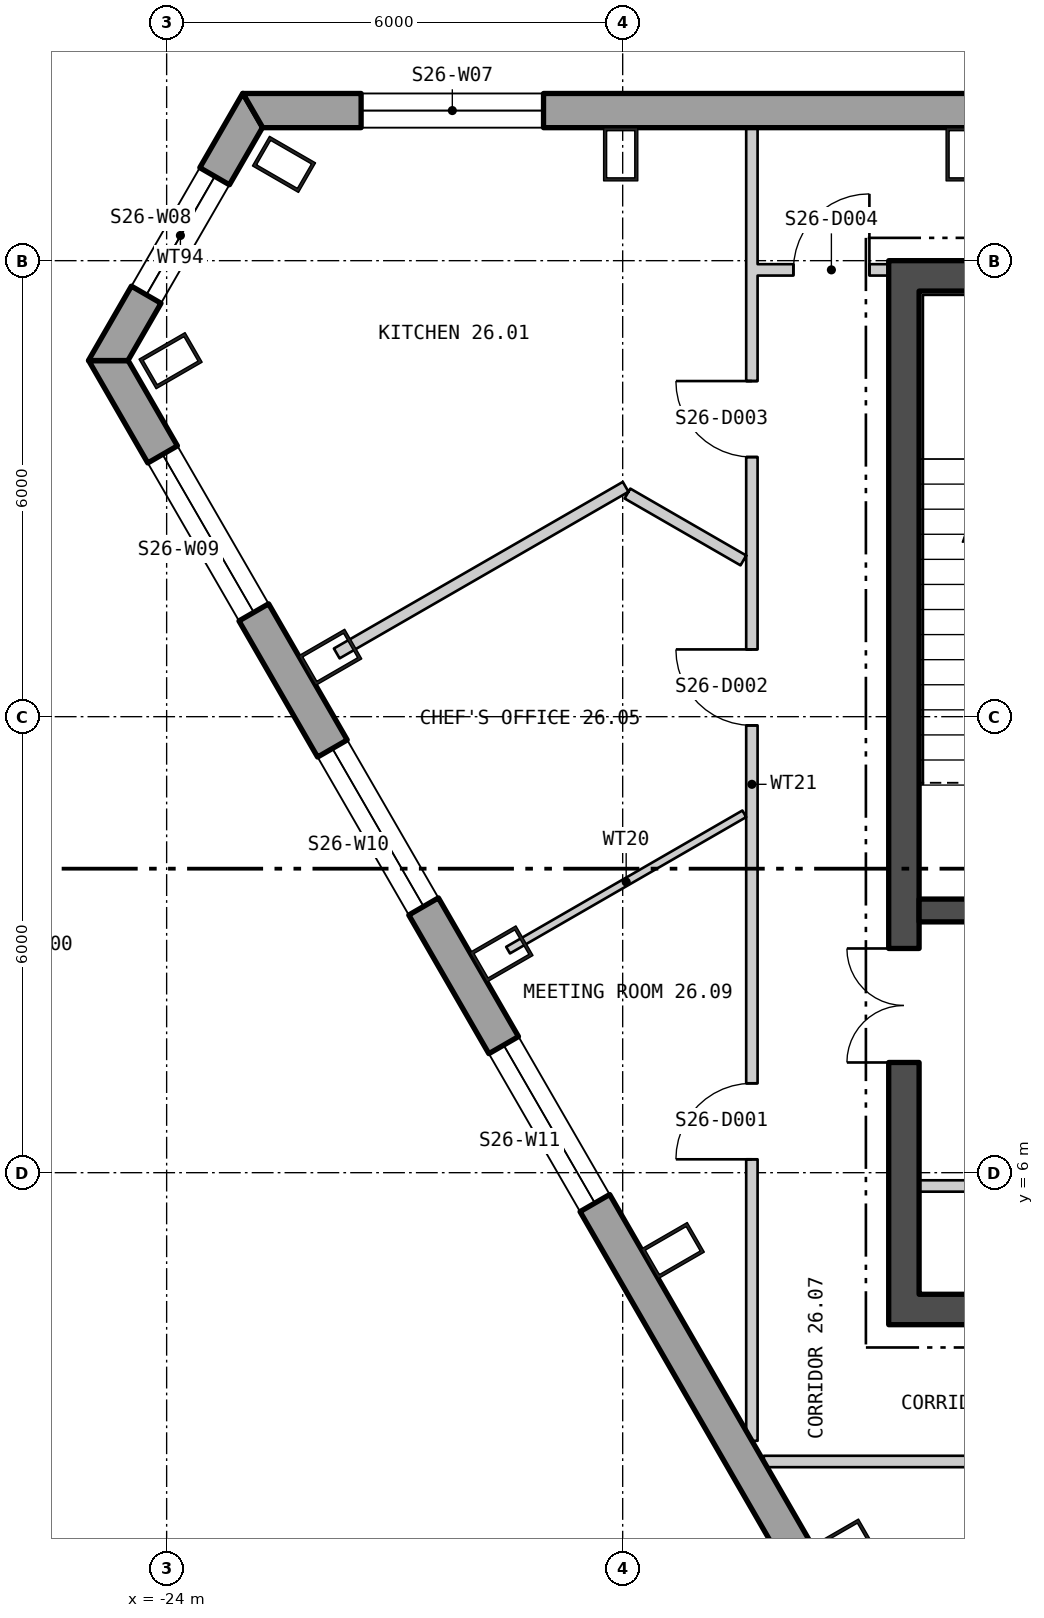
"""IFC4 building model, lengths in metres.
Left out: names, types, materials, properties, quantities, classifications, styles, units other than length and angle.
Written with IfcOpenShell. Run it as: python <this file> out.ifc"""

import sys

from ifc_helpers import new_model, si_unit, direction, frame, frame_2d, origin, origin_2d, place, context, subcontext, project, spatial, polyline, rectangle, hollow_rectangle, outline, extrude, element, fill, save


model = new_model("IFC4")
c1 = context("Model", 3, precision=1e-05, world=origin(), true_north=direction((0.0, 1.0)))
c2 = subcontext(c1, "Body", "Model", "MODEL_VIEW")
j1 = project(units=[si_unit("LENGTHUNIT", "METRE"), si_unit("PLANEANGLEUNIT", "RADIAN")], contexts=[c1])
p1 = place(None, origin())
s1 = spatial("IfcSite", under=j1, at=p1, CompositionType="ELEMENT")
p2 = place(p1, origin())
s2 = spatial("IfcBuilding", under=s1, at=p2, CompositionType="ELEMENT")
p3 = place(p2, frame((0.0, 0.0, 329.4)))
s3 = spatial("IfcBuildingStorey", under=s2, at=p3, CompositionType="ELEMENT", Elevation=329.4)
for number, where, z_axis, x_axis in (
    (1, (-13.52, 19.4, 0.0), (0.0, 0.0, 1.0), (-1.0, 0.0, 0.0)),
    (2, (-18.026, 19.4, 0.0), (0.0, 0.0, 1.0), (-1.0, 0.0, 0.0)),
    (3, (-22.456, 19.267, 0.0), (0.0, 0.0, 1.0), (-0.5, -0.866, 0.0)),
    (4, (-23.948, 16.684, 0.0), (0.0, 0.0, 1.0), (0.5, -0.866, 0.0)),
    (5, (-21.848, 12.781, 0.0), (0.0, 0.0, 1.0), (0.5, -0.866, 0.0)),
    (6, (-19.595, 8.878, 0.0), (0.0, 0.0, 1.0), (0.5, -0.866, 0.0)),
    (7, (-17.341, 4.975, 0.0), (0.0, 0.0, 1.0), (0.5, -0.866, 0.0)),
    (8, (-15.088, 1.073, 0.0), (0.0, 0.0, 1.0), (0.5, -0.866, 0.0)),
):
    element("IfcColumn", number, at=place(p3, frame(where, z_axis=z_axis, x_axis=x_axis)), inside=s3, PredefinedType="COLUMN", context=c2, shape_type="SweptSolid", body=[
        extrude(hollow_rectangle(XDim=0.45, YDim=0.7, WallThickness=0.04, at=origin_2d()), origin(), (0.0, 0.0, 1.0), 4.2),
    ])
p4 = place(p3, frame((22.865, 19.975, -0.4), z_axis=(0.0, 0.0, 1.0), x_axis=(-1.0, 0.0, 0.0)))
e9 = element("IfcWall", 9, at=p4, inside=s3, PredefinedType="SOLIDWALL", context=c2, shape_type="SweptSolid", body=[
    extrude(outline(polyline([(-0.13, -0.225), (45.86, -0.225), (45.6, 0.225), (0.13, 0.225), (-0.13, -0.225)])), origin(), (0.0, 0.0, 1.0), 4.2),
])
p5 = place(p4, frame((1.424, 0.0, 1.3)))
e10 = element("IfcOpeningElement", 10, at=p5, cuts=e9, PredefinedType="OPENING", context=c2, shape_type="SweptSolid", body=[
    extrude(rectangle(XDim=2.4, YDim=2.3, at=frame_2d((1.2, 1.15))), frame((0.0, 0.235, 0.0), z_axis=(0.0, -1.0, 0.0), x_axis=(1.0, 0.0, 0.0)), (0.0, 0.0, 1.0), 0.47),
])
p6 = place(p4, frame((14.905, 0.0, 1.3)))
e11 = element("IfcOpeningElement", 11, at=p6, cuts=e9, PredefinedType="OPENING", context=c2, shape_type="SweptSolid", body=[
    extrude(rectangle(XDim=2.4, YDim=2.3, at=frame_2d((1.2, 1.15))), frame((0.0, 0.235, 0.0), z_axis=(0.0, -1.0, 0.0), x_axis=(1.0, 0.0, 0.0)), (0.0, 0.0, 1.0), 0.47),
])
p7 = place(p4, frame((19.412, 0.0, 1.3)))
e12 = element("IfcOpeningElement", 12, at=p7, cuts=e9, PredefinedType="OPENING", context=c2, shape_type="SweptSolid", body=[
    extrude(rectangle(XDim=2.4, YDim=2.3, at=frame_2d((1.2, 1.15))), frame((0.0, 0.235, 0.0), z_axis=(0.0, -1.0, 0.0), x_axis=(1.0, 0.0, 0.0)), (0.0, 0.0, 1.0), 0.47),
])
p8 = place(p4, frame((23.918, 0.0, 1.3)))
e13 = element("IfcOpeningElement", 13, at=p8, cuts=e9, PredefinedType="OPENING", context=c2, shape_type="SweptSolid", body=[
    extrude(rectangle(XDim=2.4, YDim=2.3, at=frame_2d((1.2, 1.15))), frame((0.0, 0.235, 0.0), z_axis=(0.0, -1.0, 0.0), x_axis=(1.0, 0.0, 0.0)), (0.0, 0.0, 1.0), 0.47),
])
p9 = place(p4, frame((28.425, 0.0, 1.3)))
e14 = element("IfcOpeningElement", 14, at=p9, cuts=e9, PredefinedType="OPENING", context=c2, shape_type="SweptSolid", body=[
    extrude(rectangle(XDim=2.4, YDim=2.3, at=frame_2d((1.2, 1.15))), frame((0.0, 0.235, 0.0), z_axis=(0.0, -1.0, 0.0), x_axis=(1.0, 0.0, 0.0)), (0.0, 0.0, 1.0), 0.47),
])
p10 = place(p4, frame((32.932, 0.0, 1.3)))
e15 = element("IfcOpeningElement", 15, at=p10, cuts=e9, PredefinedType="OPENING", context=c2, shape_type="SweptSolid", body=[
    extrude(rectangle(XDim=2.4, YDim=2.3, at=frame_2d((1.2, 1.15))), frame((0.0, 0.235, 0.0), z_axis=(0.0, -1.0, 0.0), x_axis=(1.0, 0.0, 0.0)), (0.0, 0.0, 1.0), 0.47),
])
p11 = place(p4, frame((41.907, 0.0, 1.3)))
e16 = element("IfcOpeningElement", 16, at=p11, cuts=e9, PredefinedType="OPENING", context=c2, shape_type="SweptSolid", body=[
    extrude(rectangle(XDim=2.4, YDim=2.3, at=frame_2d((1.2, 1.15))), frame((0.0, 0.235, 0.0), z_axis=(0.0, -1.0, 0.0), x_axis=(1.0, 0.0, 0.0)), (0.0, 0.0, 1.0), 0.47),
])
p12 = place(p3, frame((-22.869, 19.977, -0.4), z_axis=(0.0, 0.0, 1.0), x_axis=(-0.499996551991, -0.866027394484, 0.0)))
e17 = element("IfcWall", 17, at=p12, inside=s3, PredefinedType="SOLIDWALL", context=c2, shape_type="SweptSolid", body=[
    extrude(outline(polyline([(-0.13, -0.225), (3.93, -0.225), (3.67, 0.225), (0.13, 0.225), (-0.13, -0.225)])), origin(), (0.0, 0.0, 1.0), 4.2),
])
p13 = place(p12, frame((1.0, 0.0, 1.3)))
e18 = element("IfcOpeningElement", 18, at=p13, cuts=e17, PredefinedType="OPENING", context=c2, shape_type="SweptSolid", body=[
    extrude(rectangle(XDim=1.8, YDim=2.3, at=frame_2d((0.9, 1.15))), frame((0.0, 0.235, 0.0), z_axis=(0.0, -1.0, 0.0), x_axis=(1.0, 0.0, 0.0)), (0.0, 0.0, 1.0), 0.47),
])
p14 = place(p3, frame((-24.765, 16.684, -0.18), z_axis=(0.0, 0.0, 1.0), x_axis=(0.500000141277, -0.866025322218, 0.0)))
e19 = element("IfcWall", 19, at=p14, inside=s3, PredefinedType="SOLIDWALL", context=c2, shape_type="SweptSolid", body=[
    extrude(outline(polyline([(-0.13, -0.225), (45.86, -0.225), (45.6, 0.225), (0.13, 0.225), (-0.13, -0.225)])), origin(), (0.0, 0.0, 1.0), 3.98),
])
p15 = place(p14, frame((1.424, 0.0, 1.08)))
e20 = element("IfcOpeningElement", 20, at=p15, cuts=e19, PredefinedType="OPENING", context=c2, shape_type="SweptSolid", body=[
    extrude(rectangle(XDim=2.4, YDim=2.3, at=frame_2d((1.2, 1.15))), frame((0.0, 0.235, 0.0), z_axis=(0.0, -1.0, 0.0), x_axis=(1.0, 0.0, 0.0)), (0.0, 0.0, 1.0), 0.47),
])
p16 = place(p14, frame((5.892, 0.0, 1.08)))
e21 = element("IfcOpeningElement", 21, at=p16, cuts=e19, PredefinedType="OPENING", context=c2, shape_type="SweptSolid", body=[
    extrude(rectangle(XDim=2.4, YDim=2.3, at=frame_2d((1.2, 1.15))), frame((0.0, 0.235, 0.0), z_axis=(0.0, -1.0, 0.0), x_axis=(1.0, 0.0, 0.0)), (0.0, 0.0, 1.0), 0.47),
])
p17 = place(p14, frame((10.399, 0.0, 1.08)))
e22 = element("IfcOpeningElement", 22, at=p17, cuts=e19, PredefinedType="OPENING", context=c2, shape_type="SweptSolid", body=[
    extrude(rectangle(XDim=2.4, YDim=2.3, at=frame_2d((1.2, 1.15))), frame((0.0, 0.235, 0.0), z_axis=(0.0, -1.0, 0.0), x_axis=(1.0, 0.0, 0.0)), (0.0, 0.0, 1.0), 0.47),
])
p18 = place(p14, frame((19.412, 0.0, 1.08)))
e23 = element("IfcOpeningElement", 23, at=p18, cuts=e19, PredefinedType="OPENING", context=c2, shape_type="SweptSolid", body=[
    extrude(rectangle(XDim=2.4, YDim=2.3, at=frame_2d((1.2, 1.15))), frame((0.0, 0.235, 0.0), z_axis=(0.0, -1.0, 0.0), x_axis=(1.0, 0.0, 0.0)), (0.0, 0.0, 1.0), 0.47),
])
p19 = place(p14, frame((23.918, 0.0, 1.08)))
e24 = element("IfcOpeningElement", 24, at=p19, cuts=e19, PredefinedType="OPENING", context=c2, shape_type="SweptSolid", body=[
    extrude(rectangle(XDim=2.4, YDim=2.3, at=frame_2d((1.2, 1.15))), frame((0.0, 0.235, 0.0), z_axis=(0.0, -1.0, 0.0), x_axis=(1.0, 0.0, 0.0)), (0.0, 0.0, 1.0), 0.47),
])
p20 = place(p14, frame((28.425, 0.0, 1.08)))
e25 = element("IfcOpeningElement", 25, at=p20, cuts=e19, PredefinedType="OPENING", context=c2, shape_type="SweptSolid", body=[
    extrude(rectangle(XDim=2.4, YDim=2.3, at=frame_2d((1.2, 1.15))), frame((0.0, 0.235, 0.0), z_axis=(0.0, -1.0, 0.0), x_axis=(1.0, 0.0, 0.0)), (0.0, 0.0, 1.0), 0.47),
])
p21 = place(p14, frame((37.438, 0.0, 1.08)))
e26 = element("IfcOpeningElement", 26, at=p21, cuts=e19, PredefinedType="OPENING", context=c2, shape_type="SweptSolid", body=[
    extrude(rectangle(XDim=2.4, YDim=2.3, at=frame_2d((1.2, 1.15))), frame((0.0, 0.235, 0.0), z_axis=(0.0, -1.0, 0.0), x_axis=(1.0, 0.0, 0.0)), (0.0, 0.0, 1.0), 0.47),
])
p22 = place(p14, frame((41.907, 0.0, 1.08)))
e27 = element("IfcOpeningElement", 27, at=p22, cuts=e19, PredefinedType="OPENING", context=c2, shape_type="SweptSolid", body=[
    extrude(rectangle(XDim=2.4, YDim=2.3, at=frame_2d((1.2, 1.15))), frame((0.0, 0.235, 0.0), z_axis=(0.0, -1.0, 0.0), x_axis=(1.0, 0.0, 0.0)), (0.0, 0.0, 1.0), 0.47),
])
p23 = place(p3, frame((-14.5, 4.2, 0.0), z_axis=(0.0, 0.0, 1.0), x_axis=(1.0, 0.0, 0.0)))
e28 = element("IfcWall", 28, at=p23, inside=s3, PredefinedType="SHEAR", context=c2, shape_type="SweptSolid", body=[
    extrude(rectangle(XDim=29.0, YDim=0.4, at=frame_2d((14.5, 0.0))), origin(), (0.0, 0.0, 1.0), 4.0),
])
p24 = place(p23, frame((9.0, 0.0, 0.0)))
e29 = element("IfcOpeningElement", 29, at=p24, cuts=e28, PredefinedType="OPENING", context=c2, shape_type="SweptSolid", body=[
    extrude(rectangle(XDim=1.8, YDim=2.4, at=frame_2d((0.9, 1.2))), frame((0.0, 0.21, 0.0), z_axis=(0.0, -1.0, 0.0), x_axis=(1.0, 0.0, 0.0)), (0.0, 0.0, 1.0), 0.42),
])
p25 = place(p23, frame((19.0, 0.0, 0.0)))
e30 = element("IfcOpeningElement", 30, at=p25, cuts=e28, PredefinedType="OPENING", context=c2, shape_type="SweptSolid", body=[
    extrude(rectangle(XDim=1.8, YDim=2.4, at=frame_2d((0.9, 1.2))), frame((0.0, 0.21, 0.0), z_axis=(0.0, -1.0, 0.0), x_axis=(1.0, 0.0, 0.0)), (0.0, 0.0, 1.0), 0.42),
])
p26 = place(p3, frame((-14.5, 17.8, 0.0), z_axis=(0.0, 0.0, 1.0), x_axis=(1.0, 0.0, 0.0)))
e31 = element("IfcWall", 31, at=p26, inside=s3, PredefinedType="SHEAR", context=c2, shape_type="SweptSolid", body=[
    extrude(rectangle(XDim=29.0, YDim=0.4, at=frame_2d((14.5, 0.0))), origin(), (0.0, 0.0, 1.0), 4.0),
])
p27 = place(p3, frame((-14.3, 4.4, 0.0), z_axis=(0.0, 0.0, 1.0), x_axis=(0.0, 1.0, 0.0)))
e32 = element("IfcWall", 32, at=p27, inside=s3, PredefinedType="SHEAR", context=c2, shape_type="SweptSolid", body=[
    extrude(rectangle(XDim=13.2, YDim=0.4, at=frame_2d((6.6, 0.0))), origin(), (0.0, 0.0, 1.0), 4.0),
])
p28 = place(p27, frame((3.05, 0.0, 0.0)))
e33 = element("IfcOpeningElement", 33, at=p28, cuts=e32, PredefinedType="OPENING", context=c2, shape_type="SweptSolid", body=[
    extrude(rectangle(XDim=1.5, YDim=2.1, at=frame_2d((0.75, 1.05))), frame((0.0, 0.21, 0.0), z_axis=(0.0, -1.0, 0.0), x_axis=(1.0, 0.0, 0.0)), (0.0, 0.0, 1.0), 0.42),
])
p29 = place(p3, frame((-14.1, 9.45, 0.0), z_axis=(0.0, 0.0, 1.0), x_axis=(1.0, 0.0, 0.0)))
e34 = element("IfcWall", 34, at=p29, inside=s3, PredefinedType="SHEAR", context=c2, shape_type="SweptSolid", body=[
    extrude(rectangle(XDim=3.1, YDim=0.3, at=frame_2d((1.55, 0.0))), origin(), (0.0, 0.0, 1.0), 4.0),
])
p30 = place(p29, frame((0.95, 0.0, 0.0)))
e35 = element("IfcOpeningElement", 35, at=p30, cuts=e34, PredefinedType="OPENING", context=c2, shape_type="SweptSolid", body=[
    extrude(rectangle(XDim=1.2, YDim=2.1, at=frame_2d((0.6, 1.05))), frame((0.0, 0.16, 0.0), z_axis=(0.0, -1.0, 0.0), x_axis=(1.0, 0.0, 0.0)), (0.0, 0.0, 1.0), 0.32),
])
p31 = place(p3, frame((-14.1, 5.825, 0.0), z_axis=(0.0, 0.0, 1.0), x_axis=(1.0, 0.0, 0.0)))
e36 = element("IfcWall", 36, at=p31, inside=s3, PredefinedType="PARTITIONING", context=c2, shape_type="SweptSolid", body=[
    extrude(rectangle(XDim=3.1, YDim=0.15, at=frame_2d((1.55, 0.0))), origin(), (0.0, 0.0, 1.0), 4.0),
])
p32 = place(p3, frame((-21.762, 12.832, 0.0), z_axis=(0.0, 0.0, 1.0), x_axis=(0.866272840059, 0.499571182691, 0.0)))
e37 = element("IfcWall", 37, at=p32, inside=s3, PredefinedType="PARTITIONING", context=c2, shape_type="SweptSolid", body=[
    extrude(rectangle(XDim=4.388, YDim=0.15, at=frame_2d((2.194, 0.0))), origin(), (0.0, 0.0, 1.0), 4.0),
])
p33 = place(p3, frame((-19.508, 8.928, 0.0), z_axis=(0.0, 0.0, 1.0), x_axis=(0.866074224396, 0.499915430684, 0.0)))
e38 = element("IfcWall", 38, at=p33, inside=s3, PredefinedType="PARTITIONING", context=c2, shape_type="SweptSolid", body=[
    extrude(rectangle(XDim=3.589, YDim=0.1, at=frame_2d((1.794, 0.0))), origin(), (0.0, 0.0, 1.0), 4.0),
])
p34 = place(p3, frame((-17.937, 14.936, 0.0), z_axis=(0.0, 0.0, 1.0), x_axis=(0.866138304741, -0.499804398801, 0.0)))
e39 = element("IfcWall", 39, at=p34, inside=s3, PredefinedType="PARTITIONING", context=c2, shape_type="SweptSolid", body=[
    extrude(rectangle(XDim=1.761, YDim=0.15, at=frame_2d((0.88, 0.0))), origin(), (0.0, 0.0, 1.0), 4.0),
])
p35 = place(p3, frame((-16.3, 2.472, 0.0), z_axis=(0.0, 0.0, 1.0), x_axis=(0.0, 1.0, 0.0)))
e40 = element("IfcWall", 40, at=p35, inside=s3, PredefinedType="PARTITIONING", context=c2, shape_type="SweptSolid", body=[
    extrude(rectangle(XDim=17.276, YDim=0.15, at=frame_2d((8.638, 0.0))), origin(), (0.0, 0.0, 1.0), 4.0),
])
p36 = place(p35, frame((3.704, 0.0, 0.0)))
e41 = element("IfcOpeningElement", 41, at=p36, cuts=e40, PredefinedType="OPENING", context=c2, shape_type="SweptSolid", body=[
    extrude(rectangle(XDim=1.0, YDim=2.1, at=frame_2d((0.5, 1.05))), frame((0.0, 0.085, 0.0), z_axis=(0.0, -1.0, 0.0), x_axis=(1.0, 0.0, 0.0)), (0.0, 0.0, 1.0), 0.17),
])
p37 = place(p35, frame((9.413, 0.0, 0.0)))
e42 = element("IfcOpeningElement", 42, at=p37, cuts=e40, PredefinedType="OPENING", context=c2, shape_type="SweptSolid", body=[
    extrude(rectangle(XDim=1.0, YDim=2.1, at=frame_2d((0.5, 1.05))), frame((0.0, 0.085, 0.0), z_axis=(0.0, -1.0, 0.0), x_axis=(1.0, 0.0, 0.0)), (0.0, 0.0, 1.0), 0.17),
])
p38 = place(p35, frame((12.944, 0.0, 0.0)))
e43 = element("IfcOpeningElement", 43, at=p38, cuts=e40, PredefinedType="OPENING", context=c2, shape_type="SweptSolid", body=[
    extrude(rectangle(XDim=1.0, YDim=2.1, at=frame_2d((0.5, 1.05))), frame((0.0, 0.085, 0.0), z_axis=(0.0, -1.0, 0.0), x_axis=(1.0, 0.0, 0.0)), (0.0, 0.0, 1.0), 0.17),
])
p39 = place(p3, frame((-16.225, 17.879, 0.0), z_axis=(0.0, 0.0, 1.0), x_axis=(1.0, 0.0, 0.0)))
e44 = element("IfcWall", 44, at=p39, inside=s3, PredefinedType="PARTITIONING", context=c2, shape_type="SweptSolid", body=[
    extrude(rectangle(XDim=1.725, YDim=0.15, at=frame_2d((0.863, 0.0))), origin(), (0.0, 0.0, 1.0), 4.0),
])
p40 = place(p39, frame((0.471, 0.0, 0.0)))
e45 = element("IfcOpeningElement", 45, at=p40, cuts=e44, PredefinedType="OPENING", context=c2, shape_type="SweptSolid", body=[
    extrude(rectangle(XDim=1.0, YDim=2.1, at=frame_2d((0.5, 1.05))), frame((0.0, 0.085, 0.0), z_axis=(0.0, -1.0, 0.0), x_axis=(1.0, 0.0, 0.0)), (0.0, 0.0, 1.0), 0.17),
])
p41 = place(p3, frame((-16.143, 2.2, 0.0), z_axis=(0.0, 0.0, 1.0), x_axis=(1.0, 0.0, 0.0)))
e46 = element("IfcWall", 46, at=p41, inside=s3, PredefinedType="PARTITIONING", context=c2, shape_type="SweptSolid", body=[
    extrude(rectangle(XDim=8.658, YDim=0.15, at=frame_2d((4.329, 0.0))), origin(), (0.0, 0.0, 1.0), 4.0),
])
p42 = place(p41, frame((3.738, 0.0, 0.0)))
e47 = element("IfcOpeningElement", 47, at=p42, cuts=e46, PredefinedType="OPENING", context=c2, shape_type="SweptSolid", body=[
    extrude(rectangle(XDim=1.0, YDim=2.1, at=frame_2d((0.5, 1.05))), frame((0.0, 0.085, 0.0), z_axis=(0.0, -1.0, 0.0), x_axis=(1.0, 0.0, 0.0)), (0.0, 0.0, 1.0), 0.17),
])
p43 = place(p11, origin())
e48 = element("IfcWindow", 48, at=p43, inside=s3, PartitioningType="SINGLE_PANEL", PredefinedType="WINDOW", context=c2, shape_type="SweptSolid", body=[
    extrude(rectangle(XDim=2.4, YDim=2.3, at=frame_2d((1.2, 1.15))), frame((0.0, 0.105, 0.0), z_axis=(0.0, -1.0, 0.0), x_axis=(1.0, 0.0, 0.0)), (0.0, 0.0, 1.0), 0.06),
])
fill(e16, e48)
p44 = place(p13, origin())
e49 = element("IfcWindow", 49, at=p44, inside=s3, PartitioningType="SINGLE_PANEL", PredefinedType="WINDOW", context=c2, shape_type="SweptSolid", body=[
    extrude(rectangle(XDim=1.8, YDim=2.3, at=frame_2d((0.9, 1.15))), frame((0.0, 0.105, 0.0), z_axis=(0.0, -1.0, 0.0), x_axis=(1.0, 0.0, 0.0)), (0.0, 0.0, 1.0), 0.06),
])
fill(e18, e49)
p45 = place(p15, origin())
e50 = element("IfcWindow", 50, at=p45, inside=s3, PartitioningType="SINGLE_PANEL", PredefinedType="WINDOW", context=c2, shape_type="SweptSolid", body=[
    extrude(rectangle(XDim=2.4, YDim=2.3, at=frame_2d((1.2, 1.15))), frame((0.0, 0.105, 0.0), z_axis=(0.0, -1.0, 0.0), x_axis=(1.0, 0.0, 0.0)), (0.0, 0.0, 1.0), 0.06),
])
fill(e20, e50)
p46 = place(p16, origin())
e51 = element("IfcWindow", 51, at=p46, inside=s3, PartitioningType="SINGLE_PANEL", PredefinedType="WINDOW", context=c2, shape_type="SweptSolid", body=[
    extrude(rectangle(XDim=2.4, YDim=2.3, at=frame_2d((1.2, 1.15))), frame((0.0, 0.105, 0.0), z_axis=(0.0, -1.0, 0.0), x_axis=(1.0, 0.0, 0.0)), (0.0, 0.0, 1.0), 0.06),
])
fill(e21, e51)
p47 = place(p17, origin())
e52 = element("IfcWindow", 52, at=p47, inside=s3, PartitioningType="SINGLE_PANEL", PredefinedType="WINDOW", context=c2, shape_type="SweptSolid", body=[
    extrude(rectangle(XDim=2.4, YDim=2.3, at=frame_2d((1.2, 1.15))), frame((0.0, 0.105, 0.0), z_axis=(0.0, -1.0, 0.0), x_axis=(1.0, 0.0, 0.0)), (0.0, 0.0, 1.0), 0.06),
])
fill(e22, e52)
p48 = place(p28, origin())
e53 = element("IfcDoor", 53, at=p48, inside=s3, OperationType="DOUBLE_DOOR_SINGLE_SWING", PredefinedType="DOOR", context=c2, shape_type="SweptSolid", body=[
    extrude(rectangle(XDim=1.5, YDim=2.1, at=frame_2d((0.75, 1.05))), frame((0.0, 0.025, 0.0), z_axis=(0.0, -1.0, 0.0), x_axis=(1.0, 0.0, 0.0)), (0.0, 0.0, 1.0), 0.05),
])
fill(e33, e53)
p49 = place(p36, origin())
e54 = element("IfcDoor", 54, at=p49, inside=s3, OperationType="SINGLE_SWING_RIGHT", PredefinedType="DOOR", context=c2, shape_type="SweptSolid", body=[
    extrude(rectangle(XDim=1.0, YDim=2.1, at=frame_2d((0.5, 1.05))), frame((0.0, 0.025, 0.0), z_axis=(0.0, -1.0, 0.0), x_axis=(1.0, 0.0, 0.0)), (0.0, 0.0, 1.0), 0.05),
])
fill(e41, e54)
p50 = place(p37, origin())
e55 = element("IfcDoor", 55, at=p50, inside=s3, OperationType="SINGLE_SWING_LEFT", PredefinedType="DOOR", context=c2, shape_type="SweptSolid", body=[
    extrude(rectangle(XDim=1.0, YDim=2.1, at=frame_2d((0.5, 1.05))), frame((0.0, 0.025, 0.0), z_axis=(0.0, -1.0, 0.0), x_axis=(1.0, 0.0, 0.0)), (0.0, 0.0, 1.0), 0.05),
])
fill(e42, e55)
p51 = place(p38, origin())
e56 = element("IfcDoor", 56, at=p51, inside=s3, OperationType="SINGLE_SWING_LEFT", PredefinedType="DOOR", context=c2, shape_type="SweptSolid", body=[
    extrude(rectangle(XDim=1.0, YDim=2.1, at=frame_2d((0.5, 1.05))), frame((0.0, 0.025, 0.0), z_axis=(0.0, -1.0, 0.0), x_axis=(1.0, 0.0, 0.0)), (0.0, 0.0, 1.0), 0.05),
])
fill(e43, e56)
p52 = place(p40, origin())
e57 = element("IfcDoor", 57, at=p52, inside=s3, OperationType="SINGLE_SWING_LEFT", PredefinedType="DOOR", context=c2, shape_type="SweptSolid", body=[
    extrude(rectangle(XDim=1.0, YDim=2.1, at=frame_2d((0.5, 1.05))), frame((0.0, 0.025, 0.0), z_axis=(0.0, -1.0, 0.0), x_axis=(1.0, 0.0, 0.0)), (0.0, 0.0, 1.0), 0.05),
])
fill(e45, e57)
save(model, sys.argv[1])
